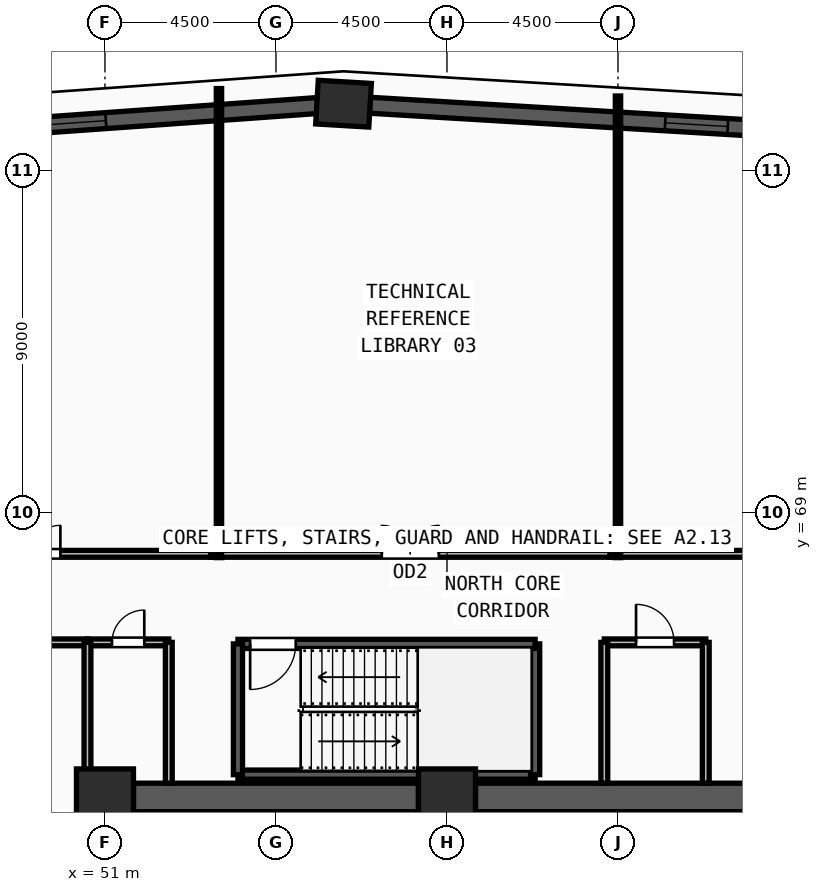
"""IFC4 building model, lengths in metres.
Left out: names, types, materials, properties, quantities, classifications, styles, units other than length and angle.
Written with IfcOpenShell. Run it as: python <this file> out.ifc"""

import sys

from ifc_helpers import new_model, si_unit, direction, frame, frame_2d, origin, origin_2d, place, context, subcontext, project, spatial, rectangle, extrude, source, transform, mapped, element, fill, save


model = new_model("IFC4")
c1 = context("Model", 3, precision=1e-05, world=origin(), true_north=direction((0.0, 1.0)))
c2 = subcontext(c1, "Body", "Model", "MODEL_VIEW")
j1 = project(units=[si_unit("LENGTHUNIT", "METRE"), si_unit("PLANEANGLEUNIT", "RADIAN")], contexts=[c1])
p1 = place(None, origin())
s1 = spatial("IfcSite", under=j1, at=p1, CompositionType="ELEMENT")
p2 = place(p1, origin())
s2 = spatial("IfcBuilding", under=s1, at=p2, CompositionType="ELEMENT")
p3 = place(p2, frame((0.0, 0.0, 144.0)))
s3 = spatial("IfcBuildingStorey", under=s2, at=p3, CompositionType="ELEMENT", Elevation=144.0)
m1 = source(origin(), c2, "Body", "SweptSolid", [
    extrude(rectangle(XDim=1.5, YDim=1.5, at=origin_2d()), origin(), (0.0, 0.0, 1.0), 3.75),
])
for number, where, z_axis, x_axis in (
    (1, (60.0, 61.5, 0.0), (0.0, 0.0, 1.0), (1.0, 0.0, 0.0)),
    (2, (51.0, 61.5, 0.0), (0.0, 0.0, 1.0), (1.0, 0.0, 0.0)),
):
    element("IfcColumn", number, at=place(p3, frame(where, z_axis=z_axis, x_axis=x_axis)), inside=s3, PredefinedType="COLUMN", context=c2, shape_type="MappedRepresentation", body=[
        mapped(m1, transform((0.0, 0.0, 0.0), x_axis=(1.0, 0.0, 0.0), y_axis=(0.0, 1.0, 0.0), z_axis=(0.0, 0.0, 1.0), scale=1.0)),
    ])
m2 = source(origin(), c2, "Body", "SweptSolid", [
    extrude(rectangle(XDim=1.4, YDim=1.15, at=origin_2d()), origin(), (0.0, 0.0, 1.0), 3.75),
])
p4 = place(p3, frame((57.278, 79.754, 0.0), z_axis=(0.0, 0.0, 1.0), x_axis=(-0.998239827924, 0.059306373576, 0.0)))
e3 = element("IfcColumn", 3, at=p4, inside=s3, PredefinedType="COLUMN", context=c2, shape_type="MappedRepresentation", body=[
    mapped(m2, transform((0.0, 0.0, 0.0), x_axis=(1.0, 0.0, 0.0), y_axis=(0.0, 1.0, 0.0), z_axis=(0.0, 0.0, 1.0), scale=1.0)),
])
p5 = place(p3, frame((88.969, 77.871, 0.0), z_axis=(0.0, 0.0, 1.0), x_axis=(-0.998239939478, 0.059304495869, 0.0)))
e4 = element("IfcWall", 4, at=p5, inside=s3, PredefinedType="SOLIDWALL", context=c2, shape_type="SweptSolid", body=[
    extrude(rectangle(XDim=31.057, YDim=0.42, at=frame_2d((15.528, 0.0))), origin(), (0.0, 0.0, 1.0), 3.57),
])
m3 = source(origin(), c2, "Body", "SweptSolid", [
    extrude(rectangle(XDim=1.65, YDim=1.95, at=frame_2d((0.825, 0.975))), frame((0.0, 0.22, 0.0), z_axis=(0.0, -1.0, 0.0), x_axis=(1.0, 0.0, 0.0)), (0.0, 0.0, 1.0), 0.44),
])
p6 = place(p5, frame((6.939, 0.0, 0.55)))
e5 = element("IfcOpeningElement", 5, at=p6, cuts=e4, PredefinedType="OPENING", context=c2, shape_type="MappedRepresentation", body=[
    mapped(m3, transform((0.0, 0.0, 0.0), x_axis=(1.0, 0.0, 0.0), y_axis=(0.0, 1.0, 0.0), z_axis=(0.0, 0.0, 1.0), scale=1.0)),
])
p7 = place(p5, frame((14.703, 0.0, 0.55)))
e6 = element("IfcOpeningElement", 6, at=p7, cuts=e4, PredefinedType="OPENING", context=c2, shape_type="MappedRepresentation", body=[
    mapped(m3, transform((0.0, 0.0, 0.0), x_axis=(1.0, 0.0, 0.0), y_axis=(0.0, 1.0, 0.0), z_axis=(0.0, 0.0, 1.0), scale=1.0)),
])
p8 = place(p5, frame((21.618, 0.0, 0.55)))
e7 = element("IfcOpeningElement", 7, at=p8, cuts=e4, PredefinedType="OPENING", context=c2, shape_type="MappedRepresentation", body=[
    mapped(m3, transform((0.0, 0.0, 0.0), x_axis=(1.0, 0.0, 0.0), y_axis=(0.0, 1.0, 0.0), z_axis=(0.0, 0.0, 1.0), scale=1.0)),
])
p9 = place(p3, frame((56.59, 79.705, 0.0), z_axis=(0.0, 0.0, 1.0), x_axis=(-0.997476660497, -0.070995153099, 0.0)))
e8 = element("IfcWall", 8, at=p9, inside=s3, PredefinedType="SOLIDWALL", context=c2, shape_type="SweptSolid", body=[
    extrude(rectangle(XDim=25.623, YDim=0.42, at=frame_2d((12.812, 0.0))), origin(), (0.0, 0.0, 1.0), 3.57),
])
p10 = place(p9, frame((5.581, 0.0, 0.55)))
e9 = element("IfcOpeningElement", 9, at=p10, cuts=e8, PredefinedType="OPENING", context=c2, shape_type="MappedRepresentation", body=[
    mapped(m3, transform((0.0, 0.0, 0.0), x_axis=(1.0, 0.0, 0.0), y_axis=(0.0, 1.0, 0.0), z_axis=(0.0, 0.0, 1.0), scale=1.0)),
])
p11 = place(p9, frame((11.986, 0.0, 0.55)))
e10 = element("IfcOpeningElement", 10, at=p11, cuts=e8, PredefinedType="OPENING", context=c2, shape_type="MappedRepresentation", body=[
    mapped(m3, transform((0.0, 0.0, 0.0), x_axis=(1.0, 0.0, 0.0), y_axis=(0.0, 1.0, 0.0), z_axis=(0.0, 0.0, 1.0), scale=1.0)),
])
p12 = place(p9, frame((18.392, 0.0, 0.55)))
e11 = element("IfcOpeningElement", 11, at=p12, cuts=e8, PredefinedType="OPENING", context=c2, shape_type="MappedRepresentation", body=[
    mapped(m3, transform((0.0, 0.0, 0.0), x_axis=(1.0, 0.0, 0.0), y_axis=(0.0, 1.0, 0.0), z_axis=(0.0, 0.0, 1.0), scale=1.0)),
])
for number, where, z_axis, x_axis in (
    (12, (51.75, 61.5, 0.0), (0.0, 0.0, 1.0), (1.0, 0.0, 0.0)),
    (13, (60.75, 61.5, 0.0), (0.0, 0.0, 1.0), (1.0, 0.0, 0.0)),
):
    element("IfcWall", number, at=place(p3, frame(where, z_axis=z_axis, x_axis=x_axis)), inside=s3, PredefinedType="SHEAR", context=c2, shape_type="SweptSolid", body=[
        extrude(rectangle(XDim=7.5, YDim=0.75, at=frame_2d((3.75, 0.0))), origin(), (0.0, 0.0, 1.0), 3.57),
    ])
p13 = place(p3, frame((54.5, 62.1, 0.0), z_axis=(0.0, 0.0, 1.0), x_axis=(1.0, 0.0, 0.0)))
e14 = element("IfcWall", 14, at=p13, inside=s3, PredefinedType="SOLIDWALL", context=c2, shape_type="SweptSolid", body=[
    extrude(rectangle(XDim=7.82, YDim=0.24, at=frame_2d((3.91, 0.0))), origin(), (0.0, 0.0, 1.0), 3.57),
])
p14 = place(p3, frame((62.32, 62.1, 0.0), z_axis=(0.0, 0.0, 1.0), x_axis=(0.0, 1.0, 0.0)))
e15 = element("IfcWall", 15, at=p14, inside=s3, PredefinedType="SOLIDWALL", context=c2, shape_type="SweptSolid", body=[
    extrude(rectangle(XDim=3.44, YDim=0.24, at=frame_2d((1.72, 0.0))), origin(), (0.0, 0.0, 1.0), 3.57),
])
p15 = place(p3, frame((62.32, 65.54, 0.0), z_axis=(0.0, 0.0, 1.0), x_axis=(-1.0, 0.0, 0.0)))
e16 = element("IfcWall", 16, at=p15, inside=s3, PredefinedType="SOLIDWALL", context=c2, shape_type="SweptSolid", body=[
    extrude(rectangle(XDim=7.82, YDim=0.24, at=frame_2d((3.91, 0.0))), origin(), (0.0, 0.0, 1.0), 3.57),
])
m4 = source(origin(), c2, "Body", "SweptSolid", [
    extrude(rectangle(XDim=1.2, YDim=2.2, at=frame_2d((0.6, 1.1))), frame((0.0, 0.13, 0.0), z_axis=(0.0, -1.0, 0.0), x_axis=(1.0, 0.0, 0.0)), (0.0, 0.0, 1.0), 0.26),
])
p16 = place(p15, frame((6.3, 0.0, 0.0)))
e17 = element("IfcOpeningElement", 17, at=p16, cuts=e16, PredefinedType="OPENING", context=c2, shape_type="MappedRepresentation", body=[
    mapped(m4, transform((0.0, 0.0, 0.0), x_axis=(1.0, 0.0, 0.0), y_axis=(0.0, 1.0, 0.0), z_axis=(0.0, 0.0, 1.0), scale=1.0)),
])
p17 = place(p3, frame((54.5, 65.54, 0.0), z_axis=(0.0, 0.0, 1.0), x_axis=(0.0, -1.0, 0.0)))
e18 = element("IfcWall", 18, at=p17, inside=s3, PredefinedType="SOLIDWALL", context=c2, shape_type="SweptSolid", body=[
    extrude(rectangle(XDim=3.44, YDim=0.24, at=frame_2d((1.72, 0.0))), origin(), (0.0, 0.0, 1.0), 3.57),
])
p18 = place(p3, frame((50.54, 65.58, 0.0), z_axis=(0.0, 0.0, 1.0), x_axis=(1.0, 0.0, 0.0)))
e19 = element("IfcWall", 19, at=p18, inside=s3, PredefinedType="PARTITIONING", context=c2, shape_type="SweptSolid", body=[
    extrude(rectangle(XDim=2.14, YDim=0.18, at=frame_2d((1.07, 0.0))), origin(), (0.0, 0.0, 1.0), 3.57),
])
m5 = source(origin(), c2, "Body", "SweptSolid", [
    extrude(rectangle(XDim=0.85, YDim=2.1, at=frame_2d((0.425, 1.05))), frame((0.0, 0.1, 0.0), z_axis=(0.0, -1.0, 0.0), x_axis=(1.0, 0.0, 0.0)), (0.0, 0.0, 1.0), 0.2),
])
p19 = place(p18, frame((0.645, 0.0, 0.0)))
e20 = element("IfcOpeningElement", 20, at=p19, cuts=e19, PredefinedType="OPENING", context=c2, shape_type="MappedRepresentation", body=[
    mapped(m5, transform((0.0, 0.0, 0.0), x_axis=(1.0, 0.0, 0.0), y_axis=(0.0, 1.0, 0.0), z_axis=(0.0, 0.0, 1.0), scale=1.0)),
])
p20 = place(p3, frame((64.14, 65.58, 0.0), z_axis=(0.0, 0.0, 1.0), x_axis=(1.0, 0.0, 0.0)))
e21 = element("IfcWall", 21, at=p20, inside=s3, PredefinedType="PARTITIONING", context=c2, shape_type="SweptSolid", body=[
    extrude(rectangle(XDim=2.67, YDim=0.18, at=frame_2d((1.335, 0.0))), origin(), (0.0, 0.0, 1.0), 3.57),
])
m6 = source(origin(), c2, "Body", "SweptSolid", [
    extrude(rectangle(XDim=1.0, YDim=2.2, at=frame_2d((0.5, 1.1))), frame((0.0, 0.1, 0.0), z_axis=(0.0, -1.0, 0.0), x_axis=(1.0, 0.0, 0.0)), (0.0, 0.0, 1.0), 0.2),
])
p21 = place(p20, frame((0.835, 0.0, 0.0)))
e22 = element("IfcOpeningElement", 22, at=p21, cuts=e21, PredefinedType="OPENING", context=c2, shape_type="MappedRepresentation", body=[
    mapped(m6, transform((0.0, 0.0, 0.0), x_axis=(1.0, 0.0, 0.0), y_axis=(0.0, 1.0, 0.0), z_axis=(0.0, 0.0, 1.0), scale=1.0)),
])
p22 = place(p3, frame((46.7, 65.58, 0.0), z_axis=(0.0, 0.0, 1.0), x_axis=(1.0, 0.0, 0.0)))
e23 = element("IfcWall", 23, at=p22, inside=s3, PredefinedType="PARTITIONING", context=c2, shape_type="SweptSolid", body=[
    extrude(rectangle(XDim=3.84, YDim=0.18, at=frame_2d((1.92, 0.0))), origin(), (0.0, 0.0, 1.0), 3.57),
])
m7 = source(origin(), c2, "Body", "SweptSolid", [
    extrude(rectangle(XDim=1.3, YDim=2.2, at=frame_2d((0.65, 1.1))), frame((0.0, 0.1, 0.0), z_axis=(0.0, -1.0, 0.0), x_axis=(1.0, 0.0, 0.0)), (0.0, 0.0, 1.0), 0.2),
])
p23 = place(p22, frame((1.27, 0.0, 0.0)))
e24 = element("IfcOpeningElement", 24, at=p23, cuts=e23, PredefinedType="OPENING", context=c2, shape_type="MappedRepresentation", body=[
    mapped(m7, transform((0.0, 0.0, 0.0), x_axis=(1.0, 0.0, 0.0), y_axis=(0.0, 1.0, 0.0), z_axis=(0.0, 0.0, 1.0), scale=1.0)),
])
p24 = place(p3, frame((64.285, 67.91, 0.0), z_axis=(0.0, 0.0, 1.0), x_axis=(1.0, 0.0, 0.0)))
e25 = element("IfcWall", 25, at=p24, inside=s3, PredefinedType="PARTITIONING", context=c2, shape_type="SweptSolid", body=[
    extrude(rectangle(XDim=11.345, YDim=0.18, at=frame_2d((5.672, 0.0))), origin(), (0.0, 0.0, 1.0), 3.57),
])
m8 = source(origin(), c2, "Body", "SweptSolid", [
    extrude(rectangle(XDim=1.5, YDim=2.2, at=frame_2d((0.75, 1.1))), frame((0.0, 0.1, 0.0), z_axis=(0.0, -1.0, 0.0), x_axis=(1.0, 0.0, 0.0)), (0.0, 0.0, 1.0), 0.2),
])
p25 = place(p24, frame((4.922, 0.0, 0.0)))
e26 = element("IfcOpeningElement", 26, at=p25, cuts=e25, PredefinedType="OPENING", context=c2, shape_type="MappedRepresentation", body=[
    mapped(m8, transform((0.0, 0.0, 0.0), x_axis=(1.0, 0.0, 0.0), y_axis=(0.0, 1.0, 0.0), z_axis=(0.0, 0.0, 1.0), scale=1.0)),
])
p26 = place(p3, frame((53.785, 67.91, 0.0), z_axis=(0.0, 0.0, 1.0), x_axis=(1.0, 0.0, 0.0)))
e27 = element("IfcWall", 27, at=p26, inside=s3, PredefinedType="PARTITIONING", context=c2, shape_type="SweptSolid", body=[
    extrude(rectangle(XDim=10.5, YDim=0.18, at=frame_2d((5.25, 0.0))), origin(), (0.0, 0.0, 1.0), 3.57),
])
p27 = place(p26, frame((4.5, 0.0, 0.0)))
e28 = element("IfcOpeningElement", 28, at=p27, cuts=e27, PredefinedType="OPENING", context=c2, shape_type="MappedRepresentation", body=[
    mapped(m8, transform((0.0, 0.0, 0.0), x_axis=(1.0, 0.0, 0.0), y_axis=(0.0, 1.0, 0.0), z_axis=(0.0, 0.0, 1.0), scale=1.0)),
])
p28 = place(p3, frame((44.37, 67.91, 0.0), z_axis=(0.0, 0.0, 1.0), x_axis=(1.0, 0.0, 0.0)))
e29 = element("IfcWall", 29, at=p28, inside=s3, PredefinedType="PARTITIONING", context=c2, shape_type="SweptSolid", body=[
    extrude(rectangle(XDim=9.415, YDim=0.18, at=frame_2d((4.708, 0.0))), origin(), (0.0, 0.0, 1.0), 3.57),
])
p29 = place(p28, frame((3.957, 0.0, 0.0)))
e30 = element("IfcOpeningElement", 30, at=p29, cuts=e29, PredefinedType="OPENING", context=c2, shape_type="MappedRepresentation", body=[
    mapped(m8, transform((0.0, 0.0, 0.0), x_axis=(1.0, 0.0, 0.0), y_axis=(0.0, 1.0, 0.0), z_axis=(0.0, 0.0, 1.0), scale=1.0)),
])
p30 = place(p3, frame((50.54, 61.95, 0.0), z_axis=(0.0, 0.0, 1.0), x_axis=(0.0, 1.0, 0.0)))
e31 = element("IfcWall", 31, at=p30, inside=s3, PredefinedType="PARTITIONING", context=c2, shape_type="SweptSolid", body=[
    extrude(rectangle(XDim=3.63, YDim=0.18, at=frame_2d((1.815, 0.0))), origin(), (0.0, 0.0, 1.0), 3.57),
])
for number, where, z_axis, x_axis in (
    (32, (52.68, 61.875, 0.0), (0.0, 0.0, 1.0), (0.0, 1.0, 0.0)),
    (33, (64.14, 61.875, 0.0), (0.0, 0.0, 1.0), (0.0, 1.0, 0.0)),
    (34, (66.81, 61.875, 0.0), (0.0, 0.0, 1.0), (0.0, 1.0, 0.0)),
):
    element("IfcWall", number, at=place(p3, frame(where, z_axis=z_axis, x_axis=x_axis)), inside=s3, PredefinedType="PARTITIONING", context=c2, shape_type="SweptSolid", body=[
        extrude(rectangle(XDim=3.705, YDim=0.18, at=frame_2d((1.853, 0.0))), origin(), (0.0, 0.0, 1.0), 3.57),
    ])
p31 = place(p3, frame((54.0, 67.81, 0.0), z_axis=(0.0, 0.0, 1.0), x_axis=(0.0, 1.0, 0.0)))
e35 = element("IfcWall", 35, at=p31, inside=s3, PredefinedType="PARTITIONING", context=c2, shape_type="SweptSolid", body=[
    extrude(rectangle(XDim=12.342, YDim=0.14, at=frame_2d((6.171, 0.0))), origin(), (0.0, 0.0, 1.0), 3.57),
])
p32 = place(p3, frame((64.5, 67.81, 0.0), z_axis=(0.0, 0.0, 1.0), x_axis=(0.0, 1.0, 0.0)))
e36 = element("IfcWall", 36, at=p32, inside=s3, PredefinedType="PARTITIONING", context=c2, shape_type="SweptSolid", body=[
    extrude(rectangle(XDim=12.146, YDim=0.14, at=frame_2d((6.073, 0.0))), origin(), (0.0, 0.0, 1.0), 3.57),
])
m9 = source(origin(), c2, "Body", "SweptSolid", [
    extrude(rectangle(XDim=1.65, YDim=1.95, at=frame_2d((0.825, 0.975))), frame((0.0, 0.03, 0.0), z_axis=(0.0, -1.0, 0.0), x_axis=(1.0, 0.0, 0.0)), (0.0, 0.0, 1.0), 0.06),
])
p33 = place(p8, origin())
e37 = element("IfcWindow", 37, at=p33, inside=s3, PartitioningType="DOUBLE_PANEL_VERTICAL", PredefinedType="WINDOW", context=c2, shape_type="MappedRepresentation", body=[
    mapped(m9, transform((0.0, 0.0, 0.0), x_axis=(1.0, 0.0, 0.0), y_axis=(0.0, 1.0, 0.0), z_axis=(0.0, 0.0, 1.0), scale=1.0)),
])
fill(e7, e37)
p34 = place(p10, origin())
e38 = element("IfcWindow", 38, at=p34, inside=s3, PartitioningType="DOUBLE_PANEL_VERTICAL", PredefinedType="WINDOW", context=c2, shape_type="MappedRepresentation", body=[
    mapped(m9, transform((0.0, 0.0, 0.0), x_axis=(1.0, 0.0, 0.0), y_axis=(0.0, 1.0, 0.0), z_axis=(0.0, 0.0, 1.0), scale=1.0)),
])
fill(e9, e38)
m10 = source(origin(), c2, "Body", "SweptSolid", [
    extrude(rectangle(XDim=1.2, YDim=2.2, at=frame_2d((0.6, 1.1))), frame((0.0, 0.025, 0.0), z_axis=(0.0, -1.0, 0.0), x_axis=(1.0, 0.0, 0.0)), (0.0, 0.0, 1.0), 0.05),
])
p35 = place(p16, origin())
e39 = element("IfcDoor", 39, at=p35, inside=s3, OperationType="SINGLE_SWING_RIGHT", PredefinedType="DOOR", context=c2, shape_type="MappedRepresentation", body=[
    mapped(m10, transform((0.0, 0.0, 0.0), x_axis=(1.0, 0.0, 0.0), y_axis=(0.0, 1.0, 0.0), z_axis=(0.0, 0.0, 1.0), scale=1.0)),
])
fill(e17, e39)
m11 = source(origin(), c2, "Body", "SweptSolid", [
    extrude(rectangle(XDim=0.85, YDim=2.1, at=frame_2d((0.425, 1.05))), frame((0.0, 0.025, 0.0), z_axis=(0.0, -1.0, 0.0), x_axis=(1.0, 0.0, 0.0)), (0.0, 0.0, 1.0), 0.05),
])
p36 = place(p19, origin())
e40 = element("IfcDoor", 40, at=p36, inside=s3, OperationType="SINGLE_SWING_RIGHT", PredefinedType="DOOR", context=c2, shape_type="MappedRepresentation", body=[
    mapped(m11, transform((0.0, 0.0, 0.0), x_axis=(1.0, 0.0, 0.0), y_axis=(0.0, 1.0, 0.0), z_axis=(0.0, 0.0, 1.0), scale=1.0)),
])
fill(e20, e40)
m12 = source(origin(), c2, "Body", "SweptSolid", [
    extrude(rectangle(XDim=1.0, YDim=2.2, at=frame_2d((0.5, 1.1))), frame((0.0, 0.025, 0.0), z_axis=(0.0, -1.0, 0.0), x_axis=(1.0, 0.0, 0.0)), (0.0, 0.0, 1.0), 0.05),
])
p37 = place(p21, origin())
e41 = element("IfcDoor", 41, at=p37, inside=s3, OperationType="SINGLE_SWING_LEFT", PredefinedType="DOOR", context=c2, shape_type="MappedRepresentation", body=[
    mapped(m12, transform((0.0, 0.0, 0.0), x_axis=(1.0, 0.0, 0.0), y_axis=(0.0, 1.0, 0.0), z_axis=(0.0, 0.0, 1.0), scale=1.0)),
])
fill(e22, e41)
m13 = source(origin(), c2, "Body", "SweptSolid", [
    extrude(rectangle(XDim=1.5, YDim=2.2, at=frame_2d((0.75, 1.1))), frame((0.0, 0.025, 0.0), z_axis=(0.0, -1.0, 0.0), x_axis=(1.0, 0.0, 0.0)), (0.0, 0.0, 1.0), 0.05),
])
p38 = place(p27, origin())
e42 = element("IfcDoor", 42, at=p38, inside=s3, OperationType="DOUBLE_DOOR_SINGLE_SWING", PredefinedType="DOOR", context=c2, shape_type="MappedRepresentation", body=[
    mapped(m13, transform((0.0, 0.0, 0.0), x_axis=(1.0, 0.0, 0.0), y_axis=(0.0, 1.0, 0.0), z_axis=(0.0, 0.0, 1.0), scale=1.0)),
])
fill(e28, e42)
p39 = place(p29, origin())
e43 = element("IfcDoor", 43, at=p39, inside=s3, OperationType="DOUBLE_DOOR_SINGLE_SWING", PredefinedType="DOOR", context=c2, shape_type="MappedRepresentation", body=[
    mapped(m13, transform((0.0, 0.0, 0.0), x_axis=(1.0, 0.0, 0.0), y_axis=(0.0, 1.0, 0.0), z_axis=(0.0, 0.0, 1.0), scale=1.0)),
])
fill(e30, e43)
save(model, sys.argv[1])
